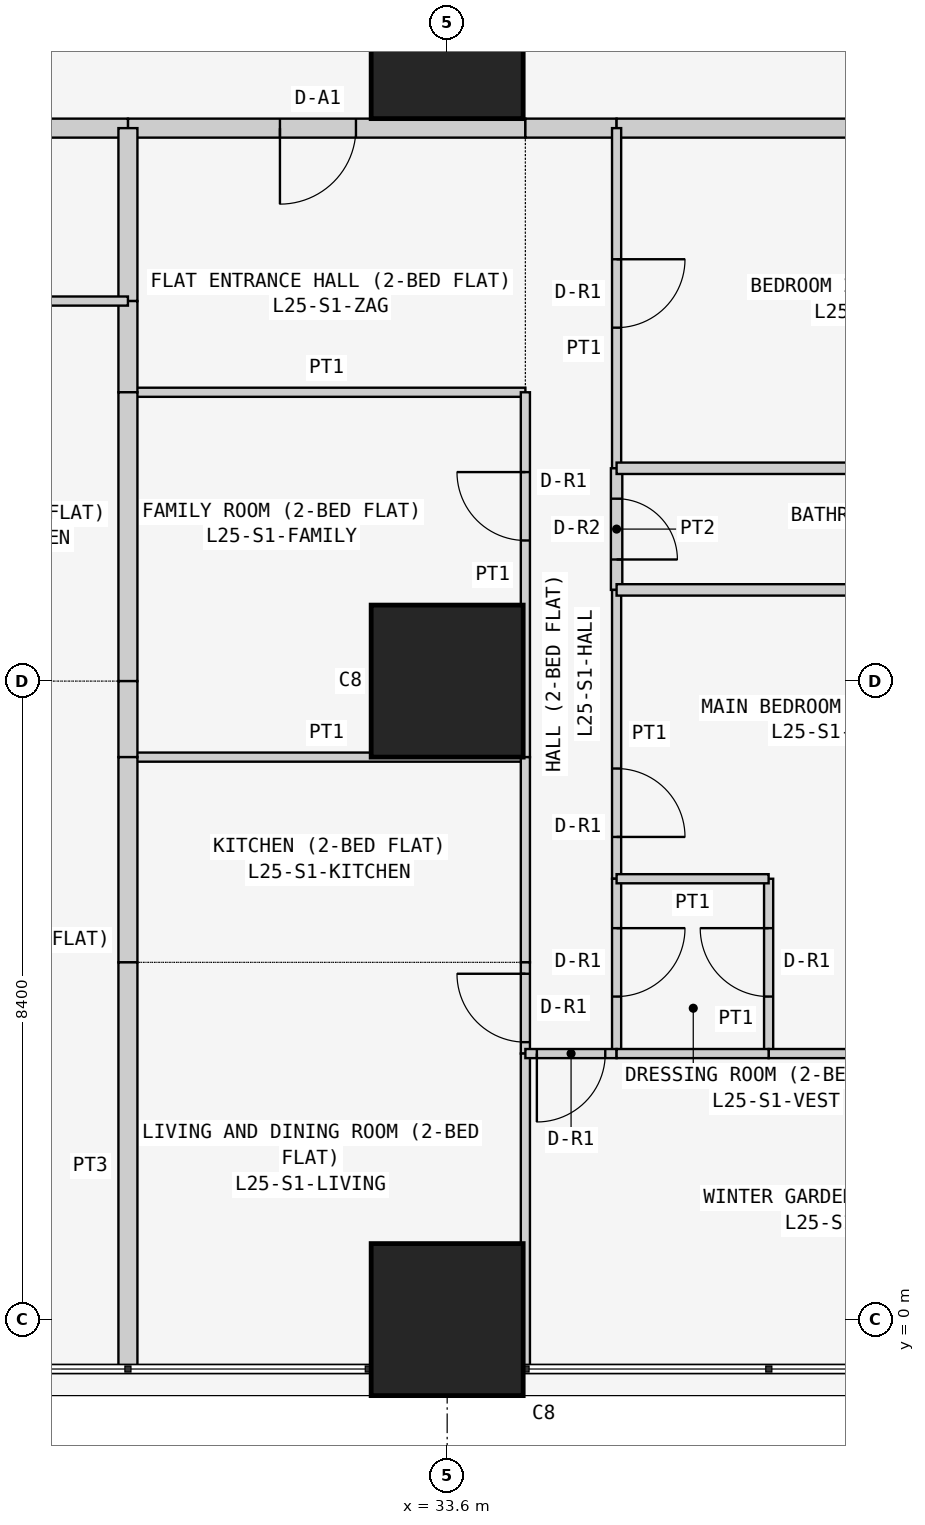
"""IFC4 building model, lengths in metres.
Left out: names, types, materials, properties, quantities, classifications, styles, units other than length and angle.
Written with IfcOpenShell. Run it as: python <this file> out.ifc"""

import sys

from ifc_helpers import new_model, si_unit, direction, frame, frame_2d, origin, origin_2d, place, context, subcontext, project, spatial, rectangle, extrude, element, fill, save


model = new_model("IFC4")
c1 = context("Model", 3, precision=1e-05, world=origin(), true_north=direction((0.0, 1.0)))
c2 = subcontext(c1, "Body", "Model", "MODEL_VIEW")
j1 = project(units=[si_unit("LENGTHUNIT", "METRE"), si_unit("PLANEANGLEUNIT", "RADIAN")], contexts=[c1])
p1 = place(None, origin())
s1 = spatial("IfcSite", under=j1, at=p1, CompositionType="ELEMENT")
p2 = place(p1, origin())
s2 = spatial("IfcBuilding", under=s1, at=p2, CompositionType="ELEMENT")
p3 = place(p2, frame((0.0, 0.0, 99.3)))
s3 = spatial("IfcBuildingStorey", under=s2, at=p3, CompositionType="ELEMENT", Elevation=99.3)
for number, where, z_axis, x_axis in (
    (1, (33.6, 0.0, 0.0), (0.0, 0.0, 1.0), (1.0, 0.0, 0.0)),
    (2, (33.6, 8.4, 0.0), (0.0, 0.0, 1.0), (1.0, 0.0, 0.0)),
    (3, (33.6, 16.8, 0.0), (0.0, 0.0, 1.0), (1.0, 0.0, 0.0)),
):
    element("IfcColumn", number, at=place(p3, frame(where, z_axis=z_axis, x_axis=x_axis)), inside=s3, PredefinedType="COLUMN", context=c2, shape_type="SweptSolid", body=[
        extrude(rectangle(XDim=2.0, YDim=2.0, at=origin_2d()), origin(), (0.0, 0.0, 1.0), 3.6),
    ])
p4 = place(p3, frame((34.629, 15.675, 0.0), z_axis=(0.0, 0.0, 1.0), x_axis=(-1.0, 0.0, 0.0)))
e4 = element("IfcWall", 4, at=p4, inside=s3, PredefinedType="PARTITIONING", context=c2, shape_type="SweptSolid", body=[
    extrude(rectangle(XDim=5.229, YDim=0.25, at=frame_2d((2.615, 0.0))), origin(), (0.0, 0.0, 1.0), 3.35),
])
p5 = place(p4, frame((2.229, 0.0, 0.0)))
e5 = element("IfcOpeningElement", 5, at=p5, cuts=e4, PredefinedType="OPENING", context=c2, shape_type="SweptSolid", body=[
    extrude(rectangle(XDim=1.0, YDim=2.1, at=frame_2d((0.5, 1.05))), frame((0.0, 0.135, 0.0), z_axis=(0.0, -1.0, 0.0), x_axis=(1.0, 0.0, 0.0)), (0.0, 0.0, 1.0), 0.27),
])
p6 = place(p3, frame((35.829, 15.675, 0.0), z_axis=(0.0, 0.0, 1.0), x_axis=(-1.0, 0.0, 0.0)))
e6 = element("IfcWall", 6, at=p6, inside=s3, PredefinedType="PARTITIONING", context=c2, shape_type="SweptSolid", body=[
    extrude(rectangle(XDim=1.2, YDim=0.25, at=frame_2d((0.6, 0.0))), origin(), (0.0, 0.0, 1.0), 3.35),
])
p7 = place(p3, frame((42.7, 15.675, 0.0), z_axis=(0.0, 0.0, 1.0), x_axis=(-1.0, 0.0, 0.0)))
e7 = element("IfcWall", 7, at=p7, inside=s3, PredefinedType="PARTITIONING", context=c2, shape_type="SweptSolid", body=[
    extrude(rectangle(XDim=6.871, YDim=0.25, at=frame_2d((3.436, 0.0))), origin(), (0.0, 0.0, 1.0), 3.35),
])
p8 = place(p3, frame((29.4, 15.675, 0.0), z_axis=(0.0, 0.0, 1.0), x_axis=(-1.0, 0.0, 0.0)))
e8 = element("IfcWall", 8, at=p8, inside=s3, PredefinedType="PARTITIONING", context=c2, shape_type="SweptSolid", body=[
    extrude(rectangle(XDim=7.1, YDim=0.25, at=frame_2d((3.55, 0.0))), origin(), (0.0, 0.0, 1.0), 3.35),
])
p9 = place(p8, frame((2.05, 0.0, 0.0)))
e9 = element("IfcOpeningElement", 9, at=p9, cuts=e8, PredefinedType="OPENING", context=c2, shape_type="SweptSolid", body=[
    extrude(rectangle(XDim=1.0, YDim=2.1, at=frame_2d((0.5, 1.05))), frame((0.0, 0.135, 0.0), z_axis=(0.0, -1.0, 0.0), x_axis=(1.0, 0.0, 0.0)), (0.0, 0.0, 1.0), 0.27),
])
p10 = place(p3, frame((29.4, 12.2, 0.0), z_axis=(0.0, 0.0, 1.0), x_axis=(1.0, 0.0, 0.0)))
e10 = element("IfcWall", 10, at=p10, inside=s3, PredefinedType="PARTITIONING", context=c2, shape_type="SweptSolid", body=[
    extrude(rectangle(XDim=5.229, YDim=0.12, at=frame_2d((2.615, 0.0))), origin(), (0.0, 0.0, 1.0), 3.35),
])
p11 = place(p3, frame((29.4, 15.675, 0.0), z_axis=(0.0, 0.0, 1.0), x_axis=(0.0, -1.0, 0.0)))
e11 = element("IfcWall", 11, at=p11, inside=s3, PredefinedType="PARTITIONING", context=c2, shape_type="SweptSolid", body=[
    extrude(rectangle(XDim=2.275, YDim=0.25, at=frame_2d((1.138, 0.0))), origin(), (0.0, 0.0, 1.0), 2.667),
])
p12 = place(p3, frame((29.4, 13.4, 0.0), z_axis=(0.0, 0.0, 1.0), x_axis=(0.0, -1.0, 0.0)))
e12 = element("IfcWall", 12, at=p12, inside=s3, PredefinedType="PARTITIONING", context=c2, shape_type="SweptSolid", body=[
    extrude(rectangle(XDim=1.2, YDim=0.25, at=frame_2d((0.6, 0.0))), origin(), (0.0, 0.0, 1.0), 2.667),
])
p13 = place(p3, frame((29.4, 7.4, 0.0), z_axis=(0.0, 0.0, 1.0), x_axis=(1.0, 0.0, 0.0)))
e13 = element("IfcWall", 13, at=p13, inside=s3, PredefinedType="PARTITIONING", context=c2, shape_type="SweptSolid", body=[
    extrude(rectangle(XDim=5.229, YDim=0.12, at=frame_2d((2.615, 0.0))), origin(), (0.0, 0.0, 1.0), 3.35),
])
p14 = place(p3, frame((34.629, 7.4, 0.0), z_axis=(0.0, 0.0, 1.0), x_axis=(0.0, 1.0, 0.0)))
e14 = element("IfcWall", 14, at=p14, inside=s3, PredefinedType="PARTITIONING", context=c2, shape_type="SweptSolid", body=[
    extrude(rectangle(XDim=4.8, YDim=0.12, at=frame_2d((2.4, 0.0))), origin(), (0.0, 0.0, 1.0), 3.35),
])
p15 = place(p14, frame((2.85, 0.0, 0.0)))
e15 = element("IfcOpeningElement", 15, at=p15, cuts=e14, PredefinedType="OPENING", context=c2, shape_type="SweptSolid", body=[
    extrude(rectangle(XDim=0.9, YDim=2.1, at=frame_2d((0.45, 1.05))), frame((0.0, 0.07, 0.0), z_axis=(0.0, -1.0, 0.0), x_axis=(1.0, 0.0, 0.0)), (0.0, 0.0, 1.0), 0.14),
])
p16 = place(p3, frame((29.4, 12.2, 0.0), z_axis=(0.0, 0.0, 1.0), x_axis=(0.0, -1.0, 0.0)))
e16 = element("IfcWall", 16, at=p16, inside=s3, PredefinedType="PARTITIONING", context=c2, shape_type="SweptSolid", body=[
    extrude(rectangle(XDim=3.8, YDim=0.25, at=frame_2d((1.9, 0.0))), origin(), (0.0, 0.0, 1.0), 2.667),
])
p17 = place(p3, frame((29.4, 8.4, 0.0), z_axis=(0.0, 0.0, 1.0), x_axis=(0.0, -1.0, 0.0)))
e17 = element("IfcWall", 17, at=p17, inside=s3, PredefinedType="PARTITIONING", context=c2, shape_type="SweptSolid", body=[
    extrude(rectangle(XDim=1.0, YDim=0.25, at=frame_2d((0.5, 0.0))), origin(), (0.0, 0.0, 1.0), 2.667),
])
p18 = place(p3, frame((34.629, 4.7, 0.0), z_axis=(0.0, 0.0, 1.0), x_axis=(0.0, 1.0, 0.0)))
e18 = element("IfcWall", 18, at=p18, inside=s3, PredefinedType="PARTITIONING", context=c2, shape_type="SweptSolid", body=[
    extrude(rectangle(XDim=2.7, YDim=0.12, at=frame_2d((1.35, 0.0))), origin(), (0.0, 0.0, 1.0), 3.35),
])
p19 = place(p3, frame((29.4, 7.4, 0.0), z_axis=(0.0, 0.0, 1.0), x_axis=(0.0, -1.0, 0.0)))
e19 = element("IfcWall", 19, at=p19, inside=s3, PredefinedType="PARTITIONING", context=c2, shape_type="SweptSolid", body=[
    extrude(rectangle(XDim=2.7, YDim=0.25, at=frame_2d((1.35, 0.0))), origin(), (0.0, 0.0, 1.0), 2.667),
])
p20 = place(p3, frame((34.629, 3.5, 0.0), z_axis=(0.0, 0.0, 1.0), x_axis=(0.0, 1.0, 0.0)))
e20 = element("IfcWall", 20, at=p20, inside=s3, PredefinedType="PARTITIONING", context=c2, shape_type="SweptSolid", body=[
    extrude(rectangle(XDim=1.2, YDim=0.12, at=frame_2d((0.6, 0.0))), origin(), (0.0, 0.0, 1.0), 3.35),
])
p21 = place(p20, frame((0.15, 0.0, 0.0)))
e21 = element("IfcOpeningElement", 21, at=p21, cuts=e20, PredefinedType="OPENING", context=c2, shape_type="SweptSolid", body=[
    extrude(rectangle(XDim=0.9, YDim=2.1, at=frame_2d((0.45, 1.05))), frame((0.0, 0.07, 0.0), z_axis=(0.0, -1.0, 0.0), x_axis=(1.0, 0.0, 0.0)), (0.0, 0.0, 1.0), 0.14),
])
p22 = place(p3, frame((34.629, -0.65, 0.0), z_axis=(0.0, 0.0, 1.0), x_axis=(0.0, 1.0, 0.0)))
e22 = element("IfcWall", 22, at=p22, inside=s3, PredefinedType="PARTITIONING", context=c2, shape_type="SweptSolid", body=[
    extrude(rectangle(XDim=4.15, YDim=0.12, at=frame_2d((2.075, 0.0))), origin(), (0.0, 0.0, 1.0), 3.35),
])
p23 = place(p3, frame((29.4, 4.7, 0.0), z_axis=(0.0, 0.0, 1.0), x_axis=(0.0, -1.0, 0.0)))
e23 = element("IfcWall", 23, at=p23, inside=s3, PredefinedType="PARTITIONING", context=c2, shape_type="SweptSolid", body=[
    extrude(rectangle(XDim=5.35, YDim=0.25, at=frame_2d((2.675, 0.0))), origin(), (0.0, 0.0, 1.0), 2.667),
])
p24 = place(p3, frame((35.829, 11.2, 0.0), z_axis=(0.0, 0.0, 1.0), x_axis=(0.0, 1.0, 0.0)))
e24 = element("IfcWall", 24, at=p24, inside=s3, PredefinedType="PARTITIONING", context=c2, shape_type="SweptSolid", body=[
    extrude(rectangle(XDim=4.475, YDim=0.12, at=frame_2d((2.238, 0.0))), origin(), (0.0, 0.0, 1.0), 3.35),
])
p25 = place(p24, frame((1.85, 0.0, 0.0)))
e25 = element("IfcOpeningElement", 25, at=p25, cuts=e24, PredefinedType="OPENING", context=c2, shape_type="SweptSolid", body=[
    extrude(rectangle(XDim=0.9, YDim=2.1, at=frame_2d((0.45, 1.05))), frame((0.0, 0.07, 0.0), z_axis=(0.0, -1.0, 0.0), x_axis=(1.0, 0.0, 0.0)), (0.0, 0.0, 1.0), 0.14),
])
p26 = place(p3, frame((35.829, 9.6, 0.0), z_axis=(0.0, 0.0, 1.0), x_axis=(0.0, 1.0, 0.0)))
e26 = element("IfcWall", 26, at=p26, inside=s3, PredefinedType="PARTITIONING", context=c2, shape_type="SweptSolid", body=[
    extrude(rectangle(XDim=1.6, YDim=0.15, at=frame_2d((0.8, 0.0))), origin(), (0.0, 0.0, 1.0), 3.35),
])
p27 = place(p26, frame((0.4, 0.0, 0.0)))
e27 = element("IfcOpeningElement", 27, at=p27, cuts=e26, PredefinedType="OPENING", context=c2, shape_type="SweptSolid", body=[
    extrude(rectangle(XDim=0.8, YDim=2.1, at=frame_2d((0.4, 1.05))), frame((0.0, 0.085, 0.0), z_axis=(0.0, -1.0, 0.0), x_axis=(1.0, 0.0, 0.0)), (0.0, 0.0, 1.0), 0.17),
])
p28 = place(p3, frame((35.829, 5.8, 0.0), z_axis=(0.0, 0.0, 1.0), x_axis=(0.0, 1.0, 0.0)))
e28 = element("IfcWall", 28, at=p28, inside=s3, PredefinedType="PARTITIONING", context=c2, shape_type="SweptSolid", body=[
    extrude(rectangle(XDim=3.8, YDim=0.12, at=frame_2d((1.9, 0.0))), origin(), (0.0, 0.0, 1.0), 3.35),
])
p29 = place(p28, frame((0.55, 0.0, 0.0)))
e29 = element("IfcOpeningElement", 29, at=p29, cuts=e28, PredefinedType="OPENING", context=c2, shape_type="SweptSolid", body=[
    extrude(rectangle(XDim=0.9, YDim=2.1, at=frame_2d((0.45, 1.05))), frame((0.0, 0.07, 0.0), z_axis=(0.0, -1.0, 0.0), x_axis=(1.0, 0.0, 0.0)), (0.0, 0.0, 1.0), 0.14),
])
p30 = place(p3, frame((35.829, 3.5, 0.0), z_axis=(0.0, 0.0, 1.0), x_axis=(0.0, 1.0, 0.0)))
e30 = element("IfcWall", 30, at=p30, inside=s3, PredefinedType="PARTITIONING", context=c2, shape_type="SweptSolid", body=[
    extrude(rectangle(XDim=2.3, YDim=0.12, at=frame_2d((1.15, 0.0))), origin(), (0.0, 0.0, 1.0), 3.35),
])
p31 = place(p30, frame((0.75, 0.0, 0.0)))
e31 = element("IfcOpeningElement", 31, at=p31, cuts=e30, PredefinedType="OPENING", context=c2, shape_type="SweptSolid", body=[
    extrude(rectangle(XDim=0.9, YDim=2.1, at=frame_2d((0.45, 1.05))), frame((0.0, 0.07, 0.0), z_axis=(0.0, -1.0, 0.0), x_axis=(1.0, 0.0, 0.0)), (0.0, 0.0, 1.0), 0.14),
])
p32 = place(p3, frame((34.629, 3.5, 0.0), z_axis=(0.0, 0.0, 1.0), x_axis=(1.0, 0.0, 0.0)))
e32 = element("IfcWall", 32, at=p32, inside=s3, PredefinedType="PARTITIONING", context=c2, shape_type="SweptSolid", body=[
    extrude(rectangle(XDim=1.2, YDim=0.12, at=frame_2d((0.6, 0.0))), origin(), (0.0, 0.0, 1.0), 3.35),
])
p33 = place(p32, frame((0.151, 0.0, 0.0)))
e33 = element("IfcOpeningElement", 33, at=p33, cuts=e32, PredefinedType="OPENING", context=c2, shape_type="SweptSolid", body=[
    extrude(rectangle(XDim=0.9, YDim=2.1, at=frame_2d((0.45, 1.05))), frame((0.0, 0.07, 0.0), z_axis=(0.0, -1.0, 0.0), x_axis=(1.0, 0.0, 0.0)), (0.0, 0.0, 1.0), 0.14),
])
for number, where, z_axis, x_axis in (
    (34, (35.829, 11.2, 0.0), (0.0, 0.0, 1.0), (1.0, 0.0, 0.0)),
    (35, (35.829, 9.6, 0.0), (0.0, 0.0, 1.0), (1.0, 0.0, 0.0)),
):
    element("IfcWall", number, at=place(p3, frame(where, z_axis=z_axis, x_axis=x_axis)), inside=s3, PredefinedType="PARTITIONING", context=c2, shape_type="SweptSolid", body=[
        extrude(rectangle(XDim=6.871, YDim=0.15, at=frame_2d((3.436, 0.0))), origin(), (0.0, 0.0, 1.0), 3.35),
    ])
p34 = place(p3, frame((37.829, 3.5, 0.0), z_axis=(0.0, 0.0, 1.0), x_axis=(0.0, 1.0, 0.0)))
e36 = element("IfcWall", 36, at=p34, inside=s3, PredefinedType="PARTITIONING", context=c2, shape_type="SweptSolid", body=[
    extrude(rectangle(XDim=2.3, YDim=0.12, at=frame_2d((1.15, 0.0))), origin(), (0.0, 0.0, 1.0), 2.667),
])
p35 = place(p34, frame((0.75, 0.0, 0.0)))
e37 = element("IfcOpeningElement", 37, at=p35, cuts=e36, PredefinedType="OPENING", context=c2, shape_type="SweptSolid", body=[
    extrude(rectangle(XDim=0.9, YDim=2.1, at=frame_2d((0.45, 1.05))), frame((0.0, 0.07, 0.0), z_axis=(0.0, -1.0, 0.0), x_axis=(1.0, 0.0, 0.0)), (0.0, 0.0, 1.0), 0.14),
])
p36 = place(p3, frame((37.829, 5.8, 0.0), z_axis=(0.0, 0.0, 1.0), x_axis=(-1.0, 0.0, 0.0)))
e38 = element("IfcWall", 38, at=p36, inside=s3, PredefinedType="PARTITIONING", context=c2, shape_type="SweptSolid", body=[
    extrude(rectangle(XDim=2.0, YDim=0.12, at=frame_2d((1.0, 0.0))), origin(), (0.0, 0.0, 1.0), 3.35),
])
p37 = place(p3, frame((42.7, 3.5, 0.0), z_axis=(0.0, 0.0, 1.0), x_axis=(-1.0, 0.0, 0.0)))
e39 = element("IfcWall", 39, at=p37, inside=s3, PredefinedType="PARTITIONING", context=c2, shape_type="SweptSolid", body=[
    extrude(rectangle(XDim=4.871, YDim=0.12, at=frame_2d((2.436, 0.0))), origin(), (0.0, 0.0, 1.0), 3.35),
])
p38 = place(p3, frame((35.829, 3.5, 0.0), z_axis=(0.0, 0.0, 1.0), x_axis=(1.0, 0.0, 0.0)))
e40 = element("IfcWall", 40, at=p38, inside=s3, PredefinedType="PARTITIONING", context=c2, shape_type="SweptSolid", body=[
    extrude(rectangle(XDim=2.0, YDim=0.12, at=frame_2d((1.0, 0.0))), origin(), (0.0, 0.0, 1.0), 3.35),
])
p39 = place(p3, frame((29.4, 13.4, 0.0), z_axis=(0.0, 0.0, 1.0), x_axis=(-1.0, 0.0, 0.0)))
e41 = element("IfcWall", 41, at=p39, inside=s3, PredefinedType="PARTITIONING", context=c2, shape_type="SweptSolid", body=[
    extrude(rectangle(XDim=4.0, YDim=0.12, at=frame_2d((2.0, 0.0))), origin(), (0.0, 0.0, 1.0), 3.35),
])
p40 = place(p39, frame((1.05, 0.0, 0.0)))
e42 = element("IfcOpeningElement", 42, at=p40, cuts=e41, PredefinedType="OPENING", context=c2, shape_type="SweptSolid", body=[
    extrude(rectangle(XDim=0.9, YDim=2.1, at=frame_2d((0.45, 1.05))), frame((0.0, 0.07, 0.0), z_axis=(0.0, -1.0, 0.0), x_axis=(1.0, 0.0, 0.0)), (0.0, 0.0, 1.0), 0.14),
])
p41 = place(p5, origin())
e43 = element("IfcDoor", 43, at=p41, inside=s3, OperationType="SINGLE_SWING_RIGHT", PredefinedType="DOOR", context=c2, shape_type="SweptSolid", body=[
    extrude(rectangle(XDim=1.0, YDim=2.1, at=frame_2d((0.5, 1.05))), frame((0.0, 0.025, 0.0), z_axis=(0.0, -1.0, 0.0), x_axis=(1.0, 0.0, 0.0)), (0.0, 0.0, 1.0), 0.05),
])
fill(e5, e43)
p42 = place(p15, origin())
e44 = element("IfcDoor", 44, at=p42, inside=s3, OperationType="SINGLE_SWING_RIGHT", PredefinedType="DOOR", context=c2, shape_type="SweptSolid", body=[
    extrude(rectangle(XDim=0.9, YDim=2.1, at=frame_2d((0.45, 1.05))), frame((0.0, 0.025, 0.0), z_axis=(0.0, -1.0, 0.0), x_axis=(1.0, 0.0, 0.0)), (0.0, 0.0, 1.0), 0.05),
])
fill(e15, e44)
p43 = place(p21, origin())
e45 = element("IfcDoor", 45, at=p43, inside=s3, OperationType="SINGLE_SWING_RIGHT", PredefinedType="DOOR", context=c2, shape_type="SweptSolid", body=[
    extrude(rectangle(XDim=0.9, YDim=2.1, at=frame_2d((0.45, 1.05))), frame((0.0, 0.025, 0.0), z_axis=(0.0, -1.0, 0.0), x_axis=(1.0, 0.0, 0.0)), (0.0, 0.0, 1.0), 0.05),
])
fill(e21, e45)
p44 = place(p25, frame((0.9, 0.0, 0.0), z_axis=(0.0, 0.0, 1.0), x_axis=(-1.0, 0.0, 0.0)))
e46 = element("IfcDoor", 46, at=p44, inside=s3, OperationType="SINGLE_SWING_LEFT", PredefinedType="DOOR", context=c2, shape_type="SweptSolid", body=[
    extrude(rectangle(XDim=0.9, YDim=2.1, at=frame_2d((0.45, 1.05))), frame((0.0, 0.025, 0.0), z_axis=(0.0, -1.0, 0.0), x_axis=(1.0, 0.0, 0.0)), (0.0, 0.0, 1.0), 0.05),
])
fill(e25, e46)
p45 = place(p27, frame((0.8, 0.0, 0.0), z_axis=(0.0, 0.0, 1.0), x_axis=(-1.0, 0.0, 0.0)))
e47 = element("IfcDoor", 47, at=p45, inside=s3, OperationType="SINGLE_SWING_RIGHT", PredefinedType="DOOR", context=c2, shape_type="SweptSolid", body=[
    extrude(rectangle(XDim=0.8, YDim=2.1, at=frame_2d((0.4, 1.05))), frame((0.0, 0.025, 0.0), z_axis=(0.0, -1.0, 0.0), x_axis=(1.0, 0.0, 0.0)), (0.0, 0.0, 1.0), 0.05),
])
fill(e27, e47)
p46 = place(p29, frame((0.9, 0.0, 0.0), z_axis=(0.0, 0.0, 1.0), x_axis=(-1.0, 0.0, 0.0)))
e48 = element("IfcDoor", 48, at=p46, inside=s3, OperationType="SINGLE_SWING_RIGHT", PredefinedType="DOOR", context=c2, shape_type="SweptSolid", body=[
    extrude(rectangle(XDim=0.9, YDim=2.1, at=frame_2d((0.45, 1.05))), frame((0.0, 0.025, 0.0), z_axis=(0.0, -1.0, 0.0), x_axis=(1.0, 0.0, 0.0)), (0.0, 0.0, 1.0), 0.05),
])
fill(e29, e48)
p47 = place(p31, frame((0.9, 0.0, 0.0), z_axis=(0.0, 0.0, 1.0), x_axis=(-1.0, 0.0, 0.0)))
e49 = element("IfcDoor", 49, at=p47, inside=s3, OperationType="SINGLE_SWING_LEFT", PredefinedType="DOOR", context=c2, shape_type="SweptSolid", body=[
    extrude(rectangle(XDim=0.9, YDim=2.1, at=frame_2d((0.45, 1.05))), frame((0.0, 0.025, 0.0), z_axis=(0.0, -1.0, 0.0), x_axis=(1.0, 0.0, 0.0)), (0.0, 0.0, 1.0), 0.05),
])
fill(e31, e49)
p48 = place(p35, origin())
e50 = element("IfcDoor", 50, at=p48, inside=s3, OperationType="SINGLE_SWING_RIGHT", PredefinedType="DOOR", context=c2, shape_type="SweptSolid", body=[
    extrude(rectangle(XDim=0.9, YDim=2.1, at=frame_2d((0.45, 1.05))), frame((0.0, 0.025, 0.0), z_axis=(0.0, -1.0, 0.0), x_axis=(1.0, 0.0, 0.0)), (0.0, 0.0, 1.0), 0.05),
])
fill(e37, e50)
p49 = place(p33, frame((0.9, 0.0, 0.0), z_axis=(0.0, 0.0, 1.0), x_axis=(-1.0, 0.0, 0.0)))
e51 = element("IfcDoor", 51, at=p49, inside=s3, OperationType="SINGLE_SWING_RIGHT", PredefinedType="DOOR", context=c2, shape_type="SweptSolid", body=[
    extrude(rectangle(XDim=0.9, YDim=2.1, at=frame_2d((0.45, 1.05))), frame((0.0, 0.025, 0.0), z_axis=(0.0, -1.0, 0.0), x_axis=(1.0, 0.0, 0.0)), (0.0, 0.0, 1.0), 0.05),
])
fill(e33, e51)
save(model, sys.argv[1])
